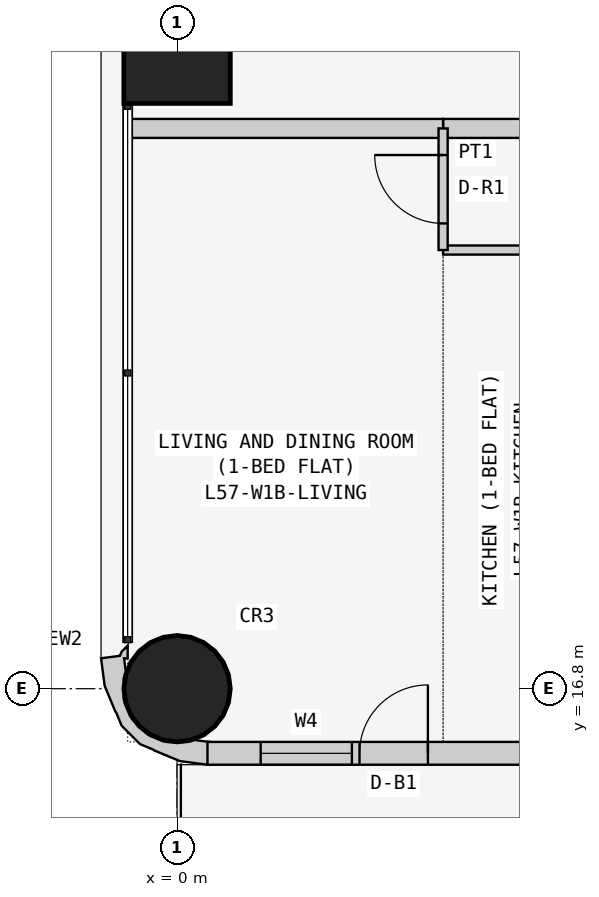
"""IFC4 building model, lengths in metres.
Left out: names, types, materials, properties, quantities, classifications, styles, units other than length and angle.
Written with IfcOpenShell. Run it as: python <this file> out.ifc"""

import sys

from ifc_helpers import new_model, si_unit, direction, frame, frame_2d, origin, origin_2d, place, context, subcontext, project, spatial, polyline, rectangle, circle, outline, extrude, element, fill, save


model = new_model("IFC4")
c1 = context("Model", 3, precision=1e-05, world=origin(), true_north=direction((0.0, 1.0)))
c2 = subcontext(c1, "Body", "Model", "MODEL_VIEW")
j1 = project(units=[si_unit("LENGTHUNIT", "METRE"), si_unit("PLANEANGLEUNIT", "RADIAN")], contexts=[c1])
p1 = place(None, origin())
s1 = spatial("IfcSite", under=j1, at=p1, CompositionType="ELEMENT")
p2 = place(p1, origin())
s2 = spatial("IfcBuilding", under=s1, at=p2, CompositionType="ELEMENT")
p3 = place(p2, frame((0.0, 0.0, 219.3)))
s3 = spatial("IfcBuildingStorey", under=s2, at=p3, CompositionType="ELEMENT", Elevation=219.3)
p4 = place(p3, frame((0.0, 16.8, 0.0), z_axis=(0.0, 0.0, 1.0), x_axis=(1.0, 0.0, 0.0)))
e1 = element("IfcColumn", 1, at=p4, inside=s3, PredefinedType="COLUMN", context=c2, shape_type="SweptSolid", body=[
    extrude(circle(Radius=0.7, at=origin_2d()), origin(), (0.0, 0.0, 1.0), 3.6),
])
p5 = place(p3, frame((0.0, 25.2, 0.0), z_axis=(0.0, 0.0, 1.0), x_axis=(1.0, 0.0, 0.0)))
e2 = element("IfcColumn", 2, at=p5, inside=s3, PredefinedType="COLUMN", context=c2, shape_type="SweptSolid", body=[
    extrude(rectangle(XDim=1.4, YDim=1.4, at=origin_2d()), origin(), (0.0, 0.0, 1.0), 3.6),
])
p6 = place(p3, frame((0.4, 15.95, 0.0), z_axis=(0.0, 0.0, 1.0), x_axis=(1.0, 0.0, 0.0)))
e3 = element("IfcWall", 3, at=p6, inside=s3, PredefinedType="SOLIDWALL", context=c2, shape_type="SweptSolid", body=[
    extrude(rectangle(XDim=15.7, YDim=0.3, at=frame_2d((7.85, 0.0))), origin(), (0.0, 0.0, 1.0), 3.45),
])
p7 = place(p6, frame((12.4, 0.0, 0.9)))
e4 = element("IfcOpeningElement", 4, at=p7, cuts=e3, PredefinedType="OPENING", context=c2, shape_type="SweptSolid", body=[
    extrude(rectangle(XDim=1.8, YDim=1.5, at=frame_2d((0.9, 0.75))), frame((0.0, 0.16, 0.0), z_axis=(0.0, -1.0, 0.0), x_axis=(1.0, 0.0, 0.0)), (0.0, 0.0, 1.0), 0.32),
])
p8 = place(p6, frame((9.55, 0.0, 1.5)))
e5 = element("IfcOpeningElement", 5, at=p8, cuts=e3, PredefinedType="OPENING", context=c2, shape_type="SweptSolid", body=[
    extrude(rectangle(XDim=0.9, YDim=0.7, at=frame_2d((0.45, 0.35))), frame((0.0, 0.16, 0.0), z_axis=(0.0, -1.0, 0.0), x_axis=(1.0, 0.0, 0.0)), (0.0, 0.0, 1.0), 0.32),
])
p9 = place(p6, frame((5.1, 0.0, 0.9)))
e6 = element("IfcOpeningElement", 6, at=p9, cuts=e3, PredefinedType="OPENING", context=c2, shape_type="SweptSolid", body=[
    extrude(rectangle(XDim=1.8, YDim=1.5, at=frame_2d((0.9, 0.75))), frame((0.0, 0.16, 0.0), z_axis=(0.0, -1.0, 0.0), x_axis=(1.0, 0.0, 0.0)), (0.0, 0.0, 1.0), 0.32),
])
p10 = place(p6, frame((2.0, 0.0, 0.0)))
e7 = element("IfcOpeningElement", 7, at=p10, cuts=e3, PredefinedType="OPENING", context=c2, shape_type="SweptSolid", body=[
    extrude(rectangle(XDim=0.9, YDim=2.4, at=frame_2d((0.45, 1.2))), frame((0.0, 0.16, 0.0), z_axis=(0.0, -1.0, 0.0), x_axis=(1.0, 0.0, 0.0)), (0.0, 0.0, 1.0), 0.32),
])
p11 = place(p6, frame((0.7, 0.0, 0.9)))
e8 = element("IfcOpeningElement", 8, at=p11, cuts=e3, PredefinedType="OPENING", context=c2, shape_type="SweptSolid", body=[
    extrude(rectangle(XDim=1.2, YDim=1.5, at=frame_2d((0.6, 0.75))), frame((0.0, 0.16, 0.0), z_axis=(0.0, -1.0, 0.0), x_axis=(1.0, 0.0, 0.0)), (0.0, 0.0, 1.0), 0.32),
])
p12 = place(p3, frame((-0.588, 17.312, 0.0), z_axis=(0.0, 0.0, 1.0), x_axis=(-0.898030234854, -0.439933741929, 0.0)))
e9 = element("IfcWall", 9, at=p12, inside=s3, PredefinedType="SOLIDWALL", context=c2, shape_type="SweptSolid", body=[
    extrude(outline(polyline([(-0.222, 1.793), (-0.39, 1.541), (-0.372, 1.532), (-0.195, 1.415), (-0.12, 1.41), (0.131, 1.287), (0.315, 1.078), (0.406, 0.814), (0.388, 0.536), (0.265, 0.285), (0.209, 0.236), (0.148, 0.053), (0.105, 0.074), (0.032, -0.076), (0.138, -0.039), (0.182, -0.0), (0.419, -0.08), (0.536, 0.266), (0.559, 0.631), (0.555, 0.651), (0.566, 0.836), (0.456, 1.159), (0.333, 1.298), (0.324, 1.316), (0.082, 1.591), (-0.222, 1.793)])), origin(), (0.0, 0.0, 1.0), 3.45),
])
p13 = place(p3, frame((3.5, 24.171, 0.0), z_axis=(0.0, 0.0, 1.0), x_axis=(1.0, 0.0, 0.0)))
e10 = element("IfcWall", 10, at=p13, inside=s3, PredefinedType="PARTITIONING", context=c2, shape_type="SweptSolid", body=[
    extrude(rectangle(XDim=5.75, YDim=0.25, at=frame_2d((2.875, 0.0))), origin(), (0.0, 0.0, 1.0), 3.45),
])
p14 = place(p3, frame((-0.65, 24.171, 0.0), z_axis=(0.0, 0.0, 1.0), x_axis=(1.0, 0.0, 0.0)))
e11 = element("IfcWall", 11, at=p14, inside=s3, PredefinedType="PARTITIONING", context=c2, shape_type="SweptSolid", body=[
    extrude(rectangle(XDim=4.15, YDim=0.25, at=frame_2d((2.075, 0.0))), origin(), (0.0, 0.0, 1.0), 3.45),
])
p15 = place(p3, frame((3.5, 22.571, 0.0), z_axis=(0.0, 0.0, 1.0), x_axis=(1.0, 0.0, 0.0)))
e12 = element("IfcWall", 12, at=p15, inside=s3, PredefinedType="PARTITIONING", context=c2, shape_type="SweptSolid", body=[
    extrude(rectangle(XDim=1.7, YDim=0.12, at=frame_2d((0.85, 0.0))), origin(), (0.0, 0.0, 1.0), 3.45),
])
p16 = place(p3, frame((3.5, 24.171, 0.0), z_axis=(0.0, 0.0, 1.0), x_axis=(0.0, -1.0, 0.0)))
e13 = element("IfcWall", 13, at=p16, inside=s3, PredefinedType="PARTITIONING", context=c2, shape_type="SweptSolid", body=[
    extrude(rectangle(XDim=1.6, YDim=0.12, at=frame_2d((0.8, 0.0))), origin(), (0.0, 0.0, 1.0), 3.45),
])
p17 = place(p16, frame((0.35, 0.0, 0.0)))
e14 = element("IfcOpeningElement", 14, at=p17, cuts=e13, PredefinedType="OPENING", context=c2, shape_type="SweptSolid", body=[
    extrude(rectangle(XDim=0.9, YDim=2.1, at=frame_2d((0.45, 1.05))), frame((0.0, 0.07, 0.0), z_axis=(0.0, -1.0, 0.0), x_axis=(1.0, 0.0, 0.0)), (0.0, 0.0, 1.0), 0.14),
])
p18 = place(p10, origin())
e15 = element("IfcDoor", 15, at=p18, inside=s3, OperationType="SINGLE_SWING_RIGHT", PredefinedType="DOOR", context=c2, shape_type="SweptSolid", body=[
    extrude(rectangle(XDim=0.9, YDim=2.4, at=frame_2d((0.45, 1.2))), frame((0.0, 0.025, 0.0), z_axis=(0.0, -1.0, 0.0), x_axis=(1.0, 0.0, 0.0)), (0.0, 0.0, 1.0), 0.05),
])
fill(e7, e15)
p19 = place(p11, origin())
e16 = element("IfcWindow", 16, at=p19, inside=s3, PartitioningType="SINGLE_PANEL", PredefinedType="WINDOW", context=c2, shape_type="SweptSolid", body=[
    extrude(rectangle(XDim=1.2, YDim=1.5, at=frame_2d((0.6, 0.75))), frame((0.0, 0.03, 0.0), z_axis=(0.0, -1.0, 0.0), x_axis=(1.0, 0.0, 0.0)), (0.0, 0.0, 1.0), 0.06),
])
fill(e8, e16)
p20 = place(p17, frame((0.9, 0.0, 0.0), z_axis=(0.0, 0.0, 1.0), x_axis=(-1.0, 0.0, 0.0)))
e17 = element("IfcDoor", 17, at=p20, inside=s3, OperationType="SINGLE_SWING_RIGHT", PredefinedType="DOOR", context=c2, shape_type="SweptSolid", body=[
    extrude(rectangle(XDim=0.9, YDim=2.1, at=frame_2d((0.45, 1.05))), frame((0.0, 0.025, 0.0), z_axis=(0.0, -1.0, 0.0), x_axis=(1.0, 0.0, 0.0)), (0.0, 0.0, 1.0), 0.05),
])
fill(e14, e17)
save(model, sys.argv[1])
